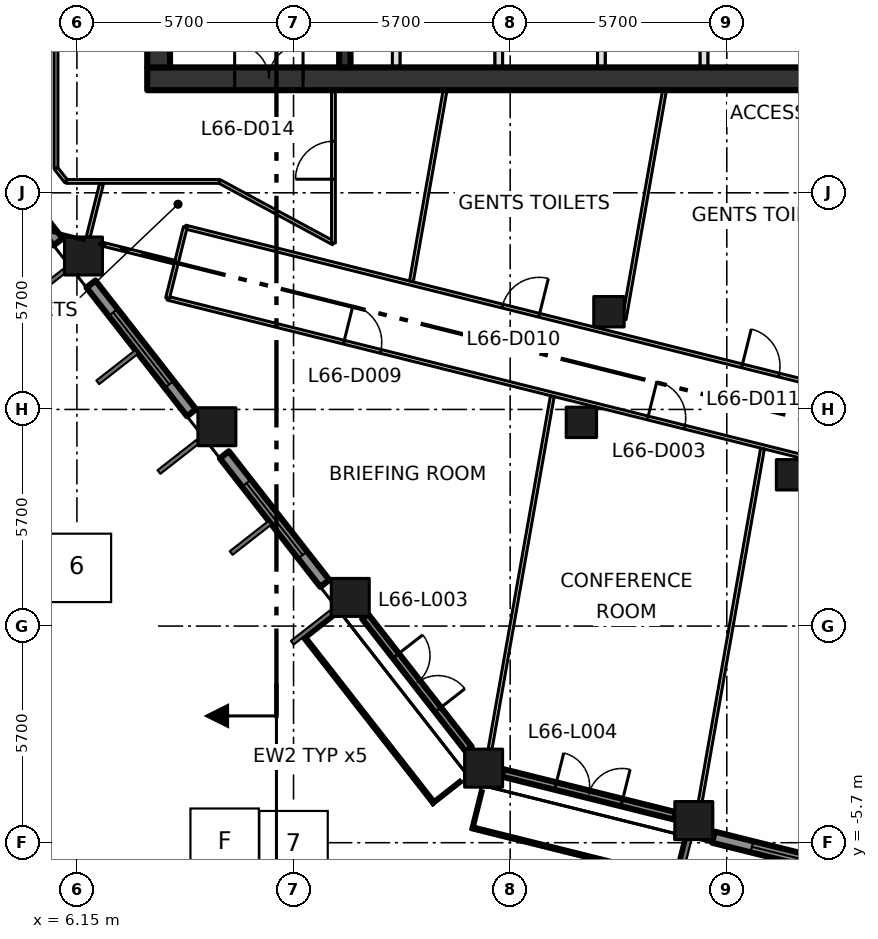
"""IFC4 building model, lengths in metres.
Left out: names, types, materials, properties, quantities, classifications, styles, units other than length and angle.
Written with IfcOpenShell. Run it as: python <this file> out.ifc"""

import sys

from ifc_helpers import new_model, si_unit, direction, frame, frame_2d, origin, origin_2d, place, context, subcontext, project, spatial, rectangle, extrude, element, fill, save


model = new_model("IFC4")
c1 = context("Model", 3, precision=1e-05, world=origin(), true_north=direction((0.0, 1.0)))
c2 = subcontext(c1, "Body", "Model", "MODEL_VIEW")
j1 = project(units=[si_unit("LENGTHUNIT", "METRE"), si_unit("PLANEANGLEUNIT", "RADIAN")], contexts=[c1])
p1 = place(None, origin())
s1 = spatial("IfcSite", under=j1, at=p1, CompositionType="ELEMENT")
p2 = place(p1, origin())
s2 = spatial("IfcBuilding", under=s1, at=p2, CompositionType="ELEMENT")
p3 = place(p2, frame((0.0, 0.0, 289.8)))
s3 = spatial("IfcBuildingStorey", under=s2, at=p3, CompositionType="ELEMENT", Elevation=289.8)
for number, where, z_axis, x_axis in (
    (1, (16.851, -3.738, 0.0), (0.0, 0.0, 1.0), (1.0, 0.0, 0.0)),
    (2, (13.342, 0.754, 0.0), (0.0, 0.0, 1.0), (1.0, 0.0, 0.0)),
    (3, (9.833, 5.245, 0.0), (0.0, 0.0, 1.0), (1.0, 0.0, 0.0)),
    (4, (6.323, 9.737, 0.0), (0.0, 0.0, 1.0), (1.0, 0.0, 0.0)),
    (5, (22.382, -5.117, 0.0), (0.0, 0.0, 1.0), (1.0, 0.0, 0.0)),
):
    element("IfcColumn", number, at=place(p3, frame(where, z_axis=z_axis, x_axis=x_axis)), inside=s3, PredefinedType="COLUMN", context=c2, shape_type="SweptSolid", body=[
        extrude(rectangle(XDim=1.0, YDim=1.0, at=origin_2d()), origin(), (0.0, 0.0, 1.0), 4.2),
    ])
for number, where, z_axis, x_axis in (
    (6, (19.424, 5.36, 0.0), (0.0, 0.0, 1.0), (1.0, 0.0, 0.0)),
    (7, (24.954, 3.981, 0.0), (0.0, 0.0, 1.0), (1.0, 0.0, 0.0)),
    (8, (20.149, 8.271, 0.0), (0.0, 0.0, 1.0), (1.0, 0.0, 0.0)),
):
    element("IfcColumn", number, at=place(p3, frame(where, z_axis=z_axis, x_axis=x_axis)), inside=s3, PredefinedType="COLUMN", context=c2, shape_type="SweptSolid", body=[
        extrude(rectangle(XDim=0.8, YDim=0.8, at=origin_2d()), origin(), (0.0, 0.0, 1.0), 4.2),
    ])
p4 = place(p3, frame((8.0, 14.4, -0.3), z_axis=(0.0, 0.0, 1.0), x_axis=(1.0, 0.0, 0.0)))
e9 = element("IfcWall", 9, at=p4, inside=s3, PredefinedType="SHEAR", context=c2, shape_type="SweptSolid", body=[
    extrude(rectangle(XDim=22.8, YDim=0.6, at=frame_2d((11.4, 0.0))), origin(), (0.0, 0.0, 1.0), 4.2),
])
p5 = place(p4, frame((2.3, 0.0, 0.3)))
e10 = element("IfcOpeningElement", 10, at=p5, cuts=e9, PredefinedType="OPENING", context=c2, shape_type="SweptSolid", body=[
    extrude(rectangle(XDim=1.8, YDim=2.1, at=frame_2d((0.9, 1.05))), frame((0.0, 0.31, 0.0), z_axis=(0.0, -1.0, 0.0), x_axis=(1.0, 0.0, 0.0)), (0.0, 0.0, 1.0), 0.62),
])
p6 = place(p3, frame((8.3, 14.7, -0.3), z_axis=(0.0, 0.0, 1.0), x_axis=(0.0, 1.0, 0.0)))
e11 = element("IfcWall", 11, at=p6, inside=s3, PredefinedType="SHEAR", context=c2, shape_type="SweptSolid", body=[
    extrude(rectangle(XDim=21.0, YDim=0.6, at=frame_2d((10.5, 0.0))), origin(), (0.0, 0.0, 1.0), 4.2),
])
p7 = place(p3, frame((13.2, 14.7, 0.0), z_axis=(0.0, 0.0, 1.0), x_axis=(0.0, 1.0, 0.0)))
e12 = element("IfcWall", 12, at=p7, inside=s3, PredefinedType="SHEAR", context=c2, shape_type="SweptSolid", body=[
    extrude(rectangle(XDim=21.0, YDim=0.3, at=frame_2d((10.5, 0.0))), origin(), (0.0, 0.0, 1.0), 3.9),
])
p8 = place(p7, frame((3.6, 0.0, 0.0)))
e13 = element("IfcOpeningElement", 13, at=p8, cuts=e12, PredefinedType="OPENING", context=c2, shape_type="SweptSolid", body=[
    extrude(rectangle(XDim=1.8, YDim=2.1, at=frame_2d((0.9, 1.05))), frame((0.0, 0.16, 0.0), z_axis=(0.0, -1.0, 0.0), x_axis=(1.0, 0.0, 0.0)), (0.0, 0.0, 1.0), 0.32),
])
p9 = place(p7, frame((11.7, 0.0, 0.0)))
e14 = element("IfcOpeningElement", 14, at=p9, cuts=e12, PredefinedType="OPENING", context=c2, shape_type="SweptSolid", body=[
    extrude(rectangle(XDim=1.2, YDim=2.1, at=frame_2d((0.6, 1.05))), frame((0.0, 0.16, 0.0), z_axis=(0.0, -1.0, 0.0), x_axis=(1.0, 0.0, 0.0)), (0.0, 0.0, 1.0), 0.32),
])
for number, where, z_axis, x_axis in (
    (15, (14.55, 14.7, 0.0), (0.0, 0.0, 1.0), (0.0, 1.0, 0.0)),
    (16, (17.25, 14.7, 0.0), (0.0, 0.0, 1.0), (0.0, 1.0, 0.0)),
    (17, (19.95, 14.7, 0.0), (0.0, 0.0, 1.0), (0.0, 1.0, 0.0)),
    (18, (22.65, 14.7, 0.0), (0.0, 0.0, 1.0), (0.0, 1.0, 0.0)),
):
    element("IfcWall", number, at=place(p3, frame(where, z_axis=z_axis, x_axis=x_axis)), inside=s3, PredefinedType="SOLIDWALL", context=c2, shape_type="SweptSolid", body=[
        extrude(rectangle(XDim=2.9, YDim=0.2, at=frame_2d((1.45, 0.0))), origin(), (0.0, 0.0, 1.0), 3.9),
    ])
p10 = place(p3, frame((3.01, 13.491, 0.0), z_axis=(0.0, 0.0, 1.0), x_axis=(0.615713519567, -0.787970089421, 0.0)))
e19 = element("IfcWall", 19, at=p10, inside=s3, PredefinedType="SOLIDWALL", context=c2, shape_type="SweptSolid", body=[
    extrude(rectangle(XDim=4.296, YDim=0.3, at=frame_2d((2.148, 0.0))), origin(), (0.0, 0.0, 1.0), 3.2),
])
p11 = place(p10, frame((0.948, 0.0, 0.8)))
e20 = element("IfcOpeningElement", 20, at=p11, cuts=e19, PredefinedType="OPENING", context=c2, shape_type="SweptSolid", body=[
    extrude(rectangle(XDim=2.4, YDim=2.1, at=frame_2d((1.2, 1.05))), frame((0.0, 0.16, 0.0), z_axis=(0.0, -1.0, 0.0), x_axis=(1.0, 0.0, 0.0)), (0.0, 0.0, 1.0), 0.32),
])
p12 = place(p3, frame((6.519, 9.0, 0.0), z_axis=(0.0, 0.0, 1.0), x_axis=(0.615634121154, -0.788032124263, 0.0)))
e21 = element("IfcWall", 21, at=p12, inside=s3, PredefinedType="SOLIDWALL", context=c2, shape_type="SweptSolid", body=[
    extrude(rectangle(XDim=4.298, YDim=0.3, at=frame_2d((2.149, 0.0))), origin(), (0.0, 0.0, 1.0), 3.2),
])
p13 = place(p12, frame((0.949, 0.0, 0.8)))
e22 = element("IfcOpeningElement", 22, at=p13, cuts=e21, PredefinedType="OPENING", context=c2, shape_type="SweptSolid", body=[
    extrude(rectangle(XDim=2.4, YDim=2.1, at=frame_2d((1.2, 1.05))), frame((0.0, 0.16, 0.0), z_axis=(0.0, -1.0, 0.0), x_axis=(1.0, 0.0, 0.0)), (0.0, 0.0, 1.0), 0.32),
])
p14 = place(p3, frame((10.029, 4.507, 0.0), z_axis=(0.0, 0.0, 1.0), x_axis=(0.615572343689, -0.788080382756, 0.0)))
e23 = element("IfcWall", 23, at=p14, inside=s3, PredefinedType="SOLIDWALL", context=c2, shape_type="SweptSolid", body=[
    extrude(rectangle(XDim=4.295, YDim=0.3, at=frame_2d((2.147, 0.0))), origin(), (0.0, 0.0, 1.0), 3.2),
])
p15 = place(p14, frame((0.948, 0.0, 0.8)))
e24 = element("IfcOpeningElement", 24, at=p15, cuts=e23, PredefinedType="OPENING", context=c2, shape_type="SweptSolid", body=[
    extrude(rectangle(XDim=2.4, YDim=2.1, at=frame_2d((1.2, 1.05))), frame((0.0, 0.16, 0.0), z_axis=(0.0, -1.0, 0.0), x_axis=(1.0, 0.0, 0.0)), (0.0, 0.0, 1.0), 0.32),
])
p16 = place(p3, frame((13.733, 0.254, 0.0), z_axis=(0.0, 0.0, 1.0), x_axis=(0.615499674676, -0.788137139382, 0.0)))
e25 = element("IfcWall", 25, at=p16, inside=s3, PredefinedType="SOLIDWALL", context=c2, shape_type="SweptSolid", body=[
    extrude(rectangle(XDim=4.431, YDim=0.2, at=frame_2d((2.215, 0.0))), origin(), (0.0, 0.0, 1.0), 3.2),
])
p17 = place(p16, frame((1.315, 0.0, 0.0)))
e26 = element("IfcOpeningElement", 26, at=p17, cuts=e25, PredefinedType="OPENING", context=c2, shape_type="SweptSolid", body=[
    extrude(rectangle(XDim=1.8, YDim=2.9, at=frame_2d((0.9, 1.45))), frame((0.0, 0.11, 0.0), z_axis=(0.0, -1.0, 0.0), x_axis=(1.0, 0.0, 0.0)), (0.0, 0.0, 1.0), 0.22),
])
p18 = place(p3, frame((12.398, -0.199, 0.0), z_axis=(0.0, 0.0, 1.0), x_axis=(0.615638738903, -0.788028516719, 0.0)))
e27 = element("IfcWall", 27, at=p18, inside=s3, PredefinedType="SOLIDWALL", context=c2, shape_type="SweptSolid", body=[
    extrude(rectangle(XDim=5.36, YDim=0.4, at=frame_2d((2.68, 0.0))), origin(), (0.0, 0.0, 1.0), 0.3),
])
p19 = place(p3, frame((17.351, -3.863, 0.0), z_axis=(0.0, 0.0, 1.0), x_axis=(0.970335948358, -0.241760516472, 0.0)))
e28 = element("IfcWall", 28, at=p19, inside=s3, PredefinedType="SOLIDWALL", context=c2, shape_type="SweptSolid", body=[
    extrude(rectangle(XDim=4.669, YDim=0.2, at=frame_2d((2.335, 0.0))), origin(), (0.0, 0.0, 1.0), 3.2),
])
p20 = place(p19, frame((1.434, 0.0, 0.0)))
e29 = element("IfcOpeningElement", 29, at=p20, cuts=e28, PredefinedType="OPENING", context=c2, shape_type="SweptSolid", body=[
    extrude(rectangle(XDim=1.8, YDim=2.9, at=frame_2d((0.9, 1.45))), frame((0.0, 0.11, 0.0), z_axis=(0.0, -1.0, 0.0), x_axis=(1.0, 0.0, 0.0)), (0.0, 0.0, 1.0), 0.22),
])
p21 = place(p3, frame((16.694, -5.069, 0.0), z_axis=(0.0, 0.0, 1.0), x_axis=(0.970289679319, -0.241946147329, 0.0)))
e30 = element("IfcWall", 30, at=p21, inside=s3, PredefinedType="SOLIDWALL", context=c2, shape_type="SweptSolid", body=[
    extrude(rectangle(XDim=5.36, YDim=0.4, at=frame_2d((2.68, 0.0))), origin(), (0.0, 0.0, 1.0), 0.3),
])
p22 = place(p3, frame((22.898, -5.555, 0.0), z_axis=(0.0, 0.0, 1.0), x_axis=(0.970315118421, -0.24184410467, 0.0)))
e31 = element("IfcWall", 31, at=p22, inside=s3, PredefinedType="SOLIDWALL", context=c2, shape_type="SweptSolid", body=[
    extrude(rectangle(XDim=4.486, YDim=0.3, at=frame_2d((2.243, 0.0))), origin(), (0.0, 0.0, 1.0), 3.2),
])
p23 = place(p22, frame((1.044, 0.0, 0.8)))
e32 = element("IfcOpeningElement", 32, at=p23, cuts=e31, PredefinedType="OPENING", context=c2, shape_type="SweptSolid", body=[
    extrude(rectangle(XDim=2.4, YDim=2.1, at=frame_2d((1.2, 1.05))), frame((0.0, 0.16, 0.0), z_axis=(0.0, -1.0, 0.0), x_axis=(1.0, 0.0, 0.0)), (0.0, 0.0, 1.0), 0.32),
])
p24 = place(p3, frame((5.6, 12.043, 0.0), z_axis=(0.0, 0.0, 1.0), x_axis=(0.0, 1.0, 0.0)))
e33 = element("IfcWall", 33, at=p24, inside=s3, PredefinedType="PARTITIONING", context=c2, shape_type="SweptSolid", body=[
    extrude(rectangle(XDim=27.162, YDim=0.1, at=frame_2d((13.581, 0.0))), origin(), (0.0, 0.0, 1.0), 3.9),
])
p25 = place(p24, frame((4.48, 0.0, 0.0)))
e34 = element("IfcOpeningElement", 34, at=p25, cuts=e33, PredefinedType="OPENING", context=c2, shape_type="SweptSolid", body=[
    extrude(rectangle(XDim=1.0, YDim=2.1, at=frame_2d((0.5, 1.05))), frame((0.0, 0.06, 0.0), z_axis=(0.0, -1.0, 0.0), x_axis=(1.0, 0.0, 0.0)), (0.0, 0.0, 1.0), 0.12),
])
p26 = place(p24, frame((12.742, 0.0, 0.0)))
e35 = element("IfcOpeningElement", 35, at=p26, cuts=e33, PredefinedType="OPENING", context=c2, shape_type="SweptSolid", body=[
    extrude(rectangle(XDim=1.0, YDim=2.1, at=frame_2d((0.5, 1.05))), frame((0.0, 0.06, 0.0), z_axis=(0.0, -1.0, 0.0), x_axis=(1.0, 0.0, 0.0)), (0.0, 0.0, 1.0), 0.12),
])
p27 = place(p24, frame((21.142, 0.0, 0.0)))
e36 = element("IfcOpeningElement", 36, at=p27, cuts=e33, PredefinedType="OPENING", context=c2, shape_type="SweptSolid", body=[
    extrude(rectangle(XDim=1.0, YDim=2.1, at=frame_2d((0.5, 1.05))), frame((0.0, 0.06, 0.0), z_axis=(0.0, -1.0, 0.0), x_axis=(1.0, 0.0, 0.0)), (0.0, 0.0, 1.0), 0.12),
])
p28 = place(p3, frame((5.6, 12.043, 0.0), z_axis=(0.0, 0.0, 1.0), x_axis=(0.615415398102, -0.788202948344, 0.0)))
e37 = element("IfcWall", 37, at=p28, inside=s3, PredefinedType="PARTITIONING", context=c2, shape_type="SweptSolid", body=[
    extrude(rectangle(XDim=0.435, YDim=0.1, at=frame_2d((0.218, 0.0))), origin(), (0.0, 0.0, 1.0), 3.9),
])
p29 = place(p3, frame((5.868, 11.7, 0.0), z_axis=(0.0, 0.0, 1.0), x_axis=(1.0, 0.0, 0.0)))
e38 = element("IfcWall", 38, at=p29, inside=s3, PredefinedType="PARTITIONING", context=c2, shape_type="SweptSolid", body=[
    extrude(rectangle(XDim=4.032, YDim=0.1, at=frame_2d((2.016, 0.0))), origin(), (0.0, 0.0, 1.0), 3.9),
])
p30 = place(p3, frame((8.535, 8.626, 0.0), z_axis=(0.0, 0.0, 1.0), x_axis=(0.970294986727, -0.241924861749, 0.0)))
e39 = element("IfcWall", 39, at=p30, inside=s3, PredefinedType="PARTITIONING", context=c2, shape_type="SweptSolid", body=[
    extrude(rectangle(XDim=28.501, YDim=0.1, at=frame_2d((14.25, 0.0))), origin(), (0.0, 0.0, 1.0), 3.9),
])
p31 = place(p30, frame((13.022, 0.0, 0.0)))
e40 = element("IfcOpeningElement", 40, at=p31, cuts=e39, PredefinedType="OPENING", context=c2, shape_type="SweptSolid", body=[
    extrude(rectangle(XDim=1.0, YDim=2.1, at=frame_2d((0.5, 1.05))), frame((0.0, 0.06, 0.0), z_axis=(0.0, -1.0, 0.0), x_axis=(1.0, 0.0, 0.0)), (0.0, 0.0, 1.0), 0.12),
])
p32 = place(p30, frame((20.622, 0.0, 0.0)))
e41 = element("IfcOpeningElement", 41, at=p32, cuts=e39, PredefinedType="OPENING", context=c2, shape_type="SweptSolid", body=[
    extrude(rectangle(XDim=1.0, YDim=2.1, at=frame_2d((0.5, 1.05))), frame((0.0, 0.06, 0.0), z_axis=(0.0, -1.0, 0.0), x_axis=(1.0, 0.0, 0.0)), (0.0, 0.0, 1.0), 0.12),
])
p33 = place(p30, frame((4.78, 0.0, 0.0)))
e42 = element("IfcOpeningElement", 42, at=p33, cuts=e39, PredefinedType="OPENING", context=c2, shape_type="SweptSolid", body=[
    extrude(rectangle(XDim=1.0, YDim=2.1, at=frame_2d((0.5, 1.05))), frame((0.0, 0.06, 0.0), z_axis=(0.0, -1.0, 0.0), x_axis=(1.0, 0.0, 0.0)), (0.0, 0.0, 1.0), 0.12),
])
p34 = place(p3, frame((9.002, 10.499, 0.0), z_axis=(0.0, 0.0, 1.0), x_axis=(0.970298340477, -0.241911410372, 0.0)))
e43 = element("IfcWall", 43, at=p34, inside=s3, PredefinedType="PARTITIONING", context=c2, shape_type="SweptSolid", body=[
    extrude(rectangle(XDim=19.88, YDim=0.1, at=frame_2d((9.94, 0.0))), origin(), (0.0, 0.0, 1.0), 3.9),
])
p35 = place(p34, frame((8.597, 0.0, 0.0)))
e44 = element("IfcOpeningElement", 44, at=p35, cuts=e43, PredefinedType="OPENING", context=c2, shape_type="SweptSolid", body=[
    extrude(rectangle(XDim=1.0, YDim=2.1, at=frame_2d((0.5, 1.05))), frame((0.0, 0.06, 0.0), z_axis=(0.0, -1.0, 0.0), x_axis=(1.0, 0.0, 0.0)), (0.0, 0.0, 1.0), 0.12),
])
p36 = place(p34, frame((15.098, 0.0, 0.0)))
e45 = element("IfcOpeningElement", 45, at=p36, cuts=e43, PredefinedType="OPENING", context=c2, shape_type="SweptSolid", body=[
    extrude(rectangle(XDim=1.0, YDim=2.1, at=frame_2d((0.5, 1.05))), frame((0.0, 0.06, 0.0), z_axis=(0.0, -1.0, 0.0), x_axis=(1.0, 0.0, 0.0)), (0.0, 0.0, 1.0), 0.12),
])
p37 = place(p3, frame((9.002, 10.499, 0.0), z_axis=(0.0, 0.0, 1.0), x_axis=(-0.241940418317, -0.970291107856, 0.0)))
e46 = element("IfcWall", 46, at=p37, inside=s3, PredefinedType="PARTITIONING", context=c2, shape_type="SweptSolid", body=[
    extrude(rectangle(XDim=1.93, YDim=0.1, at=frame_2d((0.965, 0.0))), origin(), (0.0, 0.0, 1.0), 3.9),
])
p38 = place(p3, frame((9.9, 11.7, 0.0), z_axis=(0.0, 0.0, 1.0), x_axis=(0.87965147249, -0.475618846291, 0.0)))
e47 = element("IfcWall", 47, at=p38, inside=s3, PredefinedType="PARTITIONING", context=c2, shape_type="SweptSolid", body=[
    extrude(rectangle(XDim=3.41, YDim=0.1, at=frame_2d((1.705, 0.0))), origin(), (0.0, 0.0, 1.0), 3.9),
])
p39 = place(p3, frame((12.9, 10.078, 0.0), z_axis=(0.0, 0.0, 1.0), x_axis=(0.0, 1.0, 0.0)))
e48 = element("IfcWall", 48, at=p39, inside=s3, PredefinedType="PARTITIONING", context=c2, shape_type="SweptSolid", body=[
    extrude(rectangle(XDim=4.022, YDim=0.1, at=frame_2d((2.011, 0.0))), origin(), (0.0, 0.0, 1.0), 3.9),
])
p40 = place(p39, frame((1.68, 0.0, 0.0)))
e49 = element("IfcOpeningElement", 49, at=p40, cuts=e48, PredefinedType="OPENING", context=c2, shape_type="SweptSolid", body=[
    extrude(rectangle(XDim=1.0, YDim=2.1, at=frame_2d((0.5, 1.05))), frame((0.0, 0.06, 0.0), z_axis=(0.0, -1.0, 0.0), x_axis=(1.0, 0.0, 0.0)), (0.0, 0.0, 1.0), 0.12),
])
p41 = place(p3, frame((6.797, 11.638, 0.0), z_axis=(0.0, 0.0, 1.0), x_axis=(-0.242456058691, -0.970162388265, 0.0)))
e50 = element("IfcWall", 50, at=p41, inside=s3, PredefinedType="PARTITIONING", context=c2, shape_type="SweptSolid", body=[
    extrude(rectangle(XDim=1.444, YDim=0.1, at=frame_2d((0.722, 0.0))), origin(), (0.0, 0.0, 1.0), 3.9),
])
p42 = place(p3, frame((8.72, 9.575, 0.0), z_axis=(0.0, 0.0, 1.0), x_axis=(-0.970274576003, 0.242006708918, 0.0)))
e51 = element("IfcWall", 51, at=p42, inside=s3, PredefinedType="PARTITIONING", context=c2, shape_type="SweptSolid", body=[
    extrude(rectangle(XDim=1.955, YDim=0.1, at=frame_2d((0.978, 0.0))), origin(), (0.0, 0.0, 1.0), 3.9),
])
p43 = place(p3, frame((14.951, 9.071, 0.0), z_axis=(0.0, 0.0, 1.0), x_axis=(0.173687149785, 0.984800880381, 0.0)))
e52 = element("IfcWall", 52, at=p43, inside=s3, PredefinedType="PARTITIONING", context=c2, shape_type="SweptSolid", body=[
    extrude(rectangle(XDim=5.107, YDim=0.1, at=frame_2d((2.553, 0.0))), origin(), (0.0, 0.0, 1.0), 3.9),
])
p44 = place(p3, frame((17.021, -3.238, 0.0), z_axis=(0.0, 0.0, 1.0), x_axis=(0.173621363154, 0.984812480758, 0.0)))
e53 = element("IfcWall", 53, at=p44, inside=s3, PredefinedType="PARTITIONING", context=c2, shape_type="SweptSolid", body=[
    extrude(rectangle(XDim=9.428, YDim=0.1, at=frame_2d((4.714, 0.0))), origin(), (0.0, 0.0, 1.0), 3.9),
])
p45 = place(p3, frame((20.549, 8.07, 0.0), z_axis=(0.0, 0.0, 1.0), x_axis=(0.173605636367, 0.984815253244, 0.0)))
e54 = element("IfcWall", 54, at=p45, inside=s3, PredefinedType="PARTITIONING", context=c2, shape_type="SweptSolid", body=[
    extrude(rectangle(XDim=6.123, YDim=0.1, at=frame_2d((3.062, 0.0))), origin(), (0.0, 0.0, 1.0), 3.9),
])
p46 = place(p3, frame((22.552, -4.617, 0.0), z_axis=(0.0, 0.0, 1.0), x_axis=(0.173625790791, 0.98481170016, 0.0)))
e55 = element("IfcWall", 55, at=p46, inside=s3, PredefinedType="PARTITIONING", context=c2, shape_type="SweptSolid", body=[
    extrude(rectangle(XDim=9.428, YDim=0.1, at=frame_2d((4.714, 0.0))), origin(), (0.0, 0.0, 1.0), 3.9),
])
p47 = place(p5, origin())
e56 = element("IfcDoor", 56, at=p47, inside=s3, OperationType="DOUBLE_DOOR_SINGLE_SWING", PredefinedType="DOOR", context=c2, shape_type="SweptSolid", body=[
    extrude(rectangle(XDim=1.8, YDim=2.1, at=frame_2d((0.9, 1.05))), frame((0.0, 0.025, 0.0), z_axis=(0.0, -1.0, 0.0), x_axis=(1.0, 0.0, 0.0)), (0.0, 0.0, 1.0), 0.05),
])
fill(e10, e56)
p48 = place(p13, origin())
e57 = element("IfcWindow", 57, at=p48, inside=s3, PartitioningType="DOUBLE_PANEL_VERTICAL", PredefinedType="WINDOW", context=c2, shape_type="SweptSolid", body=[
    extrude(rectangle(XDim=2.4, YDim=2.1, at=frame_2d((1.2, 1.05))), frame((0.0, 0.03, 0.0), z_axis=(0.0, -1.0, 0.0), x_axis=(1.0, 0.0, 0.0)), (0.0, 0.0, 1.0), 0.06),
])
fill(e22, e57)
p49 = place(p15, origin())
e58 = element("IfcWindow", 58, at=p49, inside=s3, PartitioningType="DOUBLE_PANEL_VERTICAL", PredefinedType="WINDOW", context=c2, shape_type="SweptSolid", body=[
    extrude(rectangle(XDim=2.4, YDim=2.1, at=frame_2d((1.2, 1.05))), frame((0.0, 0.03, 0.0), z_axis=(0.0, -1.0, 0.0), x_axis=(1.0, 0.0, 0.0)), (0.0, 0.0, 1.0), 0.06),
])
fill(e24, e58)
p50 = place(p17, origin())
e59 = element("IfcDoor", 59, at=p50, inside=s3, OperationType="DOUBLE_DOOR_SINGLE_SWING", PredefinedType="DOOR", context=c2, shape_type="SweptSolid", body=[
    extrude(rectangle(XDim=1.8, YDim=2.9, at=frame_2d((0.9, 1.45))), frame((0.0, 0.025, 0.0), z_axis=(0.0, -1.0, 0.0), x_axis=(1.0, 0.0, 0.0)), (0.0, 0.0, 1.0), 0.05),
])
fill(e26, e59)
p51 = place(p20, origin())
e60 = element("IfcDoor", 60, at=p51, inside=s3, OperationType="DOUBLE_DOOR_SINGLE_SWING", PredefinedType="DOOR", context=c2, shape_type="SweptSolid", body=[
    extrude(rectangle(XDim=1.8, YDim=2.9, at=frame_2d((0.9, 1.45))), frame((0.0, 0.025, 0.0), z_axis=(0.0, -1.0, 0.0), x_axis=(1.0, 0.0, 0.0)), (0.0, 0.0, 1.0), 0.05),
])
fill(e29, e60)
p52 = place(p23, origin())
e61 = element("IfcWindow", 61, at=p52, inside=s3, PartitioningType="DOUBLE_PANEL_VERTICAL", PredefinedType="WINDOW", context=c2, shape_type="SweptSolid", body=[
    extrude(rectangle(XDim=2.4, YDim=2.1, at=frame_2d((1.2, 1.05))), frame((0.0, 0.03, 0.0), z_axis=(0.0, -1.0, 0.0), x_axis=(1.0, 0.0, 0.0)), (0.0, 0.0, 1.0), 0.06),
])
fill(e32, e61)
p53 = place(p31, origin())
e62 = element("IfcDoor", 62, at=p53, inside=s3, OperationType="SINGLE_SWING_LEFT", PredefinedType="DOOR", context=c2, shape_type="SweptSolid", body=[
    extrude(rectangle(XDim=1.0, YDim=2.1, at=frame_2d((0.5, 1.05))), frame((0.0, 0.025, 0.0), z_axis=(0.0, -1.0, 0.0), x_axis=(1.0, 0.0, 0.0)), (0.0, 0.0, 1.0), 0.05),
])
fill(e40, e62)
p54 = place(p33, origin())
e63 = element("IfcDoor", 63, at=p54, inside=s3, OperationType="SINGLE_SWING_LEFT", PredefinedType="DOOR", context=c2, shape_type="SweptSolid", body=[
    extrude(rectangle(XDim=1.0, YDim=2.1, at=frame_2d((0.5, 1.05))), frame((0.0, 0.025, 0.0), z_axis=(0.0, -1.0, 0.0), x_axis=(1.0, 0.0, 0.0)), (0.0, 0.0, 1.0), 0.05),
])
fill(e42, e63)
p55 = place(p35, origin())
e64 = element("IfcDoor", 64, at=p55, inside=s3, OperationType="SINGLE_SWING_RIGHT", PredefinedType="DOOR", context=c2, shape_type="SweptSolid", body=[
    extrude(rectangle(XDim=1.0, YDim=2.1, at=frame_2d((0.5, 1.05))), frame((0.0, 0.025, 0.0), z_axis=(0.0, -1.0, 0.0), x_axis=(1.0, 0.0, 0.0)), (0.0, 0.0, 1.0), 0.05),
])
fill(e44, e64)
p56 = place(p36, origin())
e65 = element("IfcDoor", 65, at=p56, inside=s3, OperationType="SINGLE_SWING_LEFT", PredefinedType="DOOR", context=c2, shape_type="SweptSolid", body=[
    extrude(rectangle(XDim=1.0, YDim=2.1, at=frame_2d((0.5, 1.05))), frame((0.0, 0.025, 0.0), z_axis=(0.0, -1.0, 0.0), x_axis=(1.0, 0.0, 0.0)), (0.0, 0.0, 1.0), 0.05),
])
fill(e45, e65)
p57 = place(p40, origin())
e66 = element("IfcDoor", 66, at=p57, inside=s3, OperationType="SINGLE_SWING_LEFT", PredefinedType="DOOR", context=c2, shape_type="SweptSolid", body=[
    extrude(rectangle(XDim=1.0, YDim=2.1, at=frame_2d((0.5, 1.05))), frame((0.0, 0.025, 0.0), z_axis=(0.0, -1.0, 0.0), x_axis=(1.0, 0.0, 0.0)), (0.0, 0.0, 1.0), 0.05),
])
fill(e49, e66)
save(model, sys.argv[1])
